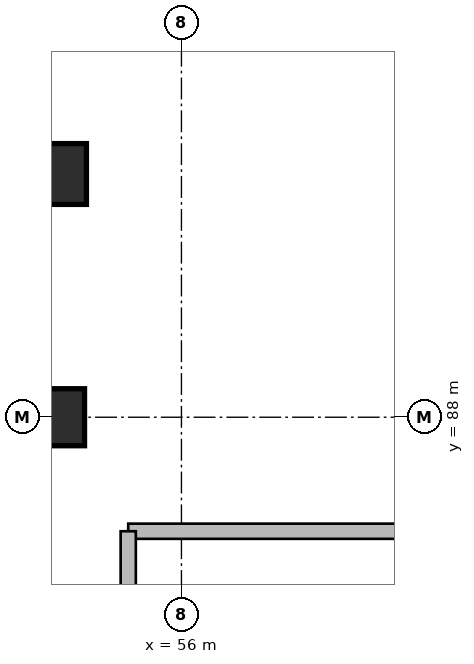
"""IFC4 building model, lengths in metres.
Left out: names, types, materials, properties, quantities, classifications, styles, units other than length and angle.
Written with IfcOpenShell. Run it as: python <this file> out.ifc"""

import sys

from ifc_helpers import new_model, si_unit, direction, frame, frame_2d, origin, origin_2d, place, context, subcontext, project, spatial, rectangle, extrude, element, save


model = new_model("IFC4")
c1 = context("Model", 3, precision=1e-05, world=origin(), true_north=direction((0.0, 1.0)))
c2 = subcontext(c1, "Body", "Model", "MODEL_VIEW")
j1 = project(units=[si_unit("LENGTHUNIT", "METRE"), si_unit("PLANEANGLEUNIT", "RADIAN")], contexts=[c1])
p1 = place(None, origin())
s1 = spatial("IfcSite", under=j1, at=p1, CompositionType="ELEMENT")
p2 = place(p1, origin())
s2 = spatial("IfcBuilding", under=s1, at=p2, CompositionType="ELEMENT")
p3 = place(p2, frame((0.0, 0.0, -3.84)))
s3 = spatial("IfcBuildingStorey", under=s2, at=p3, CompositionType="ELEMENT", Elevation=-3.84)
p4 = place(p3, frame((54.35, 88.0, 0.0), z_axis=(0.0, 0.0, 1.0), x_axis=(1.0, 0.0, 0.0)))
e1 = element("IfcColumn", 1, at=p4, inside=s3, PredefinedType="COLUMN", context=c2, shape_type="SweptSolid", body=[
    extrude(rectangle(XDim=0.75, YDim=0.75, at=origin_2d()), origin(), (0.0, 0.0, 1.0), 3.84),
])
p5 = place(p3, frame((54.35, 91.2, 0.0), z_axis=(0.0, 0.0, 1.0), x_axis=(1.0, 0.0, 0.0)))
e2 = element("IfcColumn", 2, at=p5, inside=s3, PredefinedType="COLUMN", context=c2, shape_type="SweptSolid", body=[
    extrude(rectangle(XDim=0.8, YDim=0.8, at=origin_2d()), origin(), (0.0, 0.0, 1.0), 3.84),
])
p6 = place(p3, frame((67.5, 86.5, 0.0), z_axis=(0.0, 0.0, 1.0), x_axis=(-1.0, 0.0, 0.0)))
e3 = element("IfcWall", 3, at=p6, inside=s3, PredefinedType="SOLIDWALL", context=c2, shape_type="SweptSolid", body=[
    extrude(rectangle(XDim=12.2, YDim=0.2, at=frame_2d((6.1, 0.0))), origin(), (0.0, 0.0, 1.0), 3.52),
])
p7 = place(p6, frame((5.6, 0.0, 0.0)))
e4 = element("IfcOpeningElement", 4, at=p7, cuts=e3, PredefinedType="OPENING", context=c2, shape_type="SweptSolid", body=[
    extrude(rectangle(XDim=1.0, YDim=2.1, at=frame_2d((0.5, 1.05))), frame((0.0, 0.11, 0.0), z_axis=(0.0, -1.0, 0.0), x_axis=(1.0, 0.0, 0.0)), (0.0, 0.0, 1.0), 0.22),
])
p8 = place(p3, frame((55.3, 86.5, 0.0), z_axis=(0.0, 0.0, 1.0), x_axis=(0.0, -1.0, 0.0)))
e5 = element("IfcWall", 5, at=p8, inside=s3, PredefinedType="SOLIDWALL", context=c2, shape_type="SweptSolid", body=[
    extrude(rectangle(XDim=9.3, YDim=0.2, at=frame_2d((4.65, 0.0))), origin(), (0.0, 0.0, 1.0), 3.52),
])
save(model, sys.argv[1])
